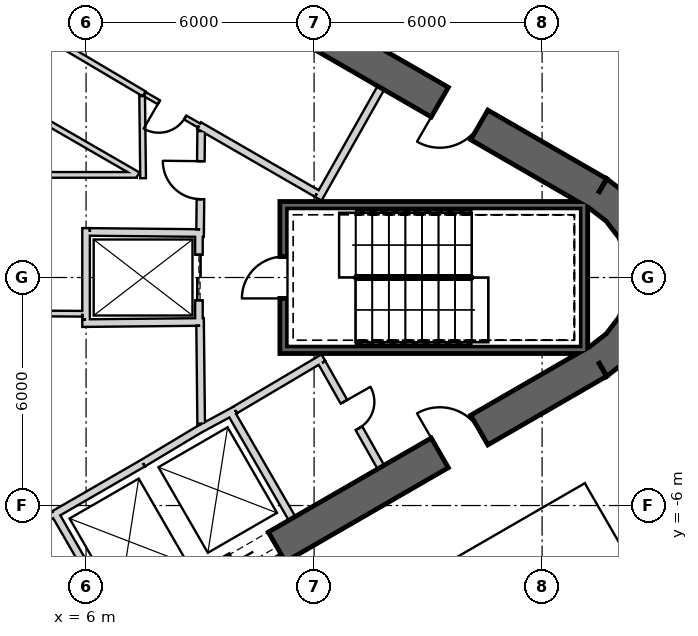
"""IFC4 building model, lengths in metres.
Left out: names, types, materials, properties, quantities, classifications, styles, units other than length and angle.
Written with IfcOpenShell. Run it as: python <this file> out.ifc"""

import sys

from ifc_helpers import new_model, si_unit, direction, frame, frame_2d, origin, place, context, subcontext, project, spatial, polyline, rectangle, outline, extrude, element, fill, save


model = new_model("IFC4")
c1 = context("Model", 3, precision=1e-05, world=origin(), true_north=direction((0.0, 1.0)))
c2 = subcontext(c1, "Body", "Model", "MODEL_VIEW")
j1 = project(units=[si_unit("LENGTHUNIT", "METRE"), si_unit("PLANEANGLEUNIT", "RADIAN")], contexts=[c1])
p1 = place(None, origin())
s1 = spatial("IfcSite", under=j1, at=p1, CompositionType="ELEMENT")
p2 = place(p1, origin())
s2 = spatial("IfcBuilding", under=s1, at=p2, CompositionType="ELEMENT")
p3 = place(p2, frame((0.0, 0.0, -5.5)))
s3 = spatial("IfcBuildingStorey", under=s2, at=p3, CompositionType="ELEMENT", Elevation=-5.5)
p4 = place(p3, frame((19.475, 2.208, 0.0), z_axis=(0.0, 0.0, 1.0), x_axis=(-0.866028369851, 0.499994862586, 0.0)))
e1 = element("IfcWall", 1, at=p4, inside=s3, PredefinedType="SHEAR", context=c2, shape_type="SweptSolid", body=[
    extrude(rectangle(XDim=31.523, YDim=0.9, at=frame_2d((15.762, 0.0))), origin(), (0.0, 0.0, 1.0), 5.5),
])
p5 = place(p4, frame((3.612, 0.0, 0.0)))
e2 = element("IfcOpeningElement", 2, at=p5, cuts=e1, PredefinedType="OPENING", context=c2, shape_type="SweptSolid", body=[
    extrude(rectangle(XDim=1.2, YDim=2.4, at=frame_2d((0.6, 1.2))), frame((0.0, 0.46, 0.0), z_axis=(0.0, -1.0, 0.0), x_axis=(1.0, 0.0, 0.0)), (0.0, 0.0, 1.0), 0.92),
])
p6 = place(p4, frame((26.712, 0.0, 0.0)))
e3 = element("IfcOpeningElement", 3, at=p6, cuts=e1, PredefinedType="OPENING", context=c2, shape_type="SweptSolid", body=[
    extrude(rectangle(XDim=1.2, YDim=2.4, at=frame_2d((0.6, 1.2))), frame((0.0, 0.46, 0.0), z_axis=(0.0, -1.0, 0.0), x_axis=(1.0, 0.0, 0.0)), (0.0, 0.0, 1.0), 0.92),
])
p7 = place(p3, frame((-7.825, -17.97, 0.0), z_axis=(0.0, 0.0, 1.0), x_axis=(0.866028369851, 0.499994862586, 0.0)))
e4 = element("IfcWall", 4, at=p7, inside=s3, PredefinedType="SHEAR", context=c2, shape_type="SweptSolid", body=[
    extrude(rectangle(XDim=31.523, YDim=0.9, at=frame_2d((15.762, 0.0))), origin(), (0.0, 0.0, 1.0), 5.5),
])
p8 = place(p7, frame((17.862, 0.0, 0.0)))
e5 = element("IfcOpeningElement", 5, at=p8, cuts=e4, PredefinedType="OPENING", context=c2, shape_type="SweptSolid", body=[
    extrude(rectangle(XDim=1.2, YDim=2.4, at=frame_2d((0.6, 1.2))), frame((0.0, 0.46, 0.0), z_axis=(0.0, -1.0, 0.0), x_axis=(1.0, 0.0, 0.0)), (0.0, 0.0, 1.0), 0.92),
])
p9 = place(p7, frame((20.562, 0.0, 0.0)))
e6 = element("IfcOpeningElement", 6, at=p9, cuts=e4, PredefinedType="OPENING", context=c2, shape_type="SweptSolid", body=[
    extrude(rectangle(XDim=1.2, YDim=2.4, at=frame_2d((0.6, 1.2))), frame((0.0, 0.46, 0.0), z_axis=(0.0, -1.0, 0.0), x_axis=(1.0, 0.0, 0.0)), (0.0, 0.0, 1.0), 0.92),
])
p10 = place(p7, frame((26.712, 0.0, 0.0)))
e7 = element("IfcOpeningElement", 7, at=p10, cuts=e4, PredefinedType="OPENING", context=c2, shape_type="SweptSolid", body=[
    extrude(rectangle(XDim=1.2, YDim=2.4, at=frame_2d((0.6, 1.2))), frame((0.0, 0.46, 0.0), z_axis=(0.0, -1.0, 0.0), x_axis=(1.0, 0.0, 0.0)), (0.0, 0.0, 1.0), 0.92),
])
p11 = place(p7, frame((3.612, 0.0, 0.0)))
e8 = element("IfcOpeningElement", 8, at=p11, cuts=e4, PredefinedType="OPENING", context=c2, shape_type="SweptSolid", body=[
    extrude(rectangle(XDim=1.2, YDim=2.4, at=frame_2d((0.6, 1.2))), frame((0.0, 0.46, 0.0), z_axis=(0.0, -1.0, 0.0), x_axis=(1.0, 0.0, 0.0)), (0.0, 0.0, 1.0), 0.92),
])
p12 = place(p3, origin())
e9 = element("IfcWall", 9, at=p12, inside=s3, PredefinedType="SHEAR", context=c2, shape_type="SweptSolid", body=[
    extrude(outline(polyline([(19.7, -2.598), (20.321, -2.121), (20.798, -1.5), (21.098, -0.777), (21.2, 0.0), (21.098, 0.777), (20.798, 1.5), (20.321, 2.121), (19.7, 2.598), (19.25, 1.819), (19.685, 1.485), (20.019, 1.05), (20.229, 0.543), (20.3, 0.0), (20.229, -0.543), (20.019, -1.05), (19.685, -1.485), (19.25, -1.819), (19.7, -2.598)])), origin(), (0.0, 0.0, 1.0), 5.5),
])
p13 = place(p3, frame((6.795, -9.01, 0.0), z_axis=(0.0, 0.0, 1.0), x_axis=(-0.499984717929, 0.866034226713, 0.0)))
e10 = element("IfcWall", 10, at=p13, inside=s3, PredefinedType="PLUMBINGWALL", context=c2, shape_type="SweptSolid", body=[
    extrude(rectangle(XDim=3.25, YDim=0.2, at=frame_2d((1.625, 0.0))), origin(), (0.0, 0.0, 1.0), 5.1),
])
p14 = place(p3, frame((5.159, -6.236, 0.0), z_axis=(0.0, 0.0, 1.0), x_axis=(0.866036505625, 0.499980770555, 0.0)))
e11 = element("IfcWall", 11, at=p14, inside=s3, PredefinedType="PLUMBINGWALL", context=c2, shape_type="SweptSolid", body=[
    extrude(rectangle(XDim=2.7, YDim=0.2, at=frame_2d((1.35, 0.0))), origin(), (0.0, 0.0, 1.0), 5.1),
])
p15 = place(p3, frame((9.795, -3.525, 0.0), z_axis=(0.0, 0.0, 1.0), x_axis=(0.499984717929, -0.866034226713, 0.0)))
e12 = element("IfcWall", 12, at=p15, inside=s3, PredefinedType="PLUMBINGWALL", context=c2, shape_type="SweptSolid", body=[
    extrude(rectangle(XDim=3.25, YDim=0.2, at=frame_2d((1.625, 0.0))), origin(), (0.0, 0.0, 1.0), 5.1),
])
p16 = place(p3, frame((8.974, -3.999, 0.0), z_axis=(0.0, 0.0, 1.0), x_axis=(0.880907015104, 0.473289373154, 0.0)))
e13 = element("IfcWall", 13, at=p16, inside=s3, PredefinedType="PLUMBINGWALL", context=c2, shape_type="SweptSolid", body=[
    extrude(rectangle(XDim=1.078, YDim=0.2, at=frame_2d((0.539, 0.0))), origin(), (0.0, 0.0, 1.0), 5.1),
])
p17 = place(p3, frame((7.497, -4.886, 0.0), z_axis=(0.0, 0.0, 1.0), x_axis=(0.857516281273, 0.51445682749, 0.0)))
e14 = element("IfcWall", 14, at=p17, inside=s3, PredefinedType="PLUMBINGWALL", context=c2, shape_type="SweptSolid", body=[
    extrude(rectangle(XDim=1.845, YDim=0.2, at=frame_2d((0.922, 0.0))), origin(), (0.0, 0.0, 1.0), 5.1),
])
p18 = place(p3, frame((19.2, 1.9, -0.4), z_axis=(0.0, 0.0, 1.0), x_axis=(-1.0, 0.0, 0.0)))
e15 = element("IfcWall", 15, at=p18, inside=s3, PredefinedType="SHEAR", context=c2, shape_type="SweptSolid", body=[
    extrude(rectangle(XDim=8.1, YDim=0.2, at=frame_2d((4.05, 0.0))), origin(), (0.0, 0.0, 1.0), 5.5),
])
p19 = place(p3, frame((19.1, -2.0, -0.4), z_axis=(0.0, 0.0, 1.0), x_axis=(0.0, 1.0, 0.0)))
e16 = element("IfcWall", 16, at=p19, inside=s3, PredefinedType="SHEAR", context=c2, shape_type="SweptSolid", body=[
    extrude(rectangle(XDim=3.8, YDim=0.2, at=frame_2d((1.9, 0.0))), origin(), (0.0, 0.0, 1.0), 5.5),
])
p20 = place(p3, frame((11.1, -1.9, -0.4), z_axis=(0.0, 0.0, 1.0), x_axis=(1.0, 0.0, 0.0)))
e17 = element("IfcWall", 17, at=p20, inside=s3, PredefinedType="SHEAR", context=c2, shape_type="SweptSolid", body=[
    extrude(rectangle(XDim=7.9, YDim=0.2, at=frame_2d((3.95, 0.0))), origin(), (0.0, 0.0, 1.0), 5.5),
])
p21 = place(p3, frame((11.2, -1.8, -0.4), z_axis=(0.0, 0.0, 1.0), x_axis=(0.0, 1.0, 0.0)))
e18 = element("IfcWall", 18, at=p21, inside=s3, PredefinedType="SHEAR", context=c2, shape_type="SweptSolid", body=[
    extrude(rectangle(XDim=3.6, YDim=0.2, at=frame_2d((1.8, 0.0))), origin(), (0.0, 0.0, 1.0), 5.5),
])
p22 = place(p21, frame((1.25, 0.0, 0.4)))
e19 = element("IfcOpeningElement", 19, at=p22, cuts=e18, PredefinedType="OPENING", context=c2, shape_type="SweptSolid", body=[
    extrude(rectangle(XDim=1.1, YDim=2.1, at=frame_2d((0.55, 1.05))), frame((0.0, 0.11, 0.0), z_axis=(0.0, -1.0, 0.0), x_axis=(1.0, 0.0, 0.0)), (0.0, 0.0, 1.0), 0.22),
])
p23 = place(p3, frame((8.97, 1.2, 0.0), z_axis=(0.0, 0.0, 1.0), x_axis=(0.0, -1.0, 0.0)))
e20 = element("IfcWall", 20, at=p23, inside=s3, PredefinedType="PLUMBINGWALL", context=c2, shape_type="SweptSolid", body=[
    extrude(rectangle(XDim=2.4, YDim=0.2, at=frame_2d((1.2, 0.0))), origin(), (0.0, 0.0, 1.0), 5.1),
])
p24 = place(p23, frame((0.6, 0.0, 0.0)))
e21 = element("IfcOpeningElement", 21, at=p24, cuts=e20, PredefinedType="OPENING", context=c2, shape_type="SweptSolid", body=[
    extrude(rectangle(XDim=1.2, YDim=2.4, at=frame_2d((0.6, 1.2))), frame((0.0, 0.11, 0.0), z_axis=(0.0, -1.0, 0.0), x_axis=(1.0, 0.0, 0.0)), (0.0, 0.0, 1.0), 0.22),
])
p25 = place(p3, frame((9.1, -1.169, 0.0), z_axis=(0.0, 0.0, 1.0), x_axis=(-0.999950064753, -0.009993397809, 0.0)))
e22 = element("IfcWall", 22, at=p25, inside=s3, PredefinedType="PLUMBINGWALL", context=c2, shape_type="SweptSolid", body=[
    extrude(rectangle(XDim=3.2, YDim=0.2, at=frame_2d((1.6, 0.0))), origin(), (0.0, 0.0, 1.0), 5.1),
])
p26 = place(p3, frame((6.0, -1.1, 0.0), z_axis=(0.0, 0.0, 1.0), x_axis=(0.0, 1.0, 0.0)))
e23 = element("IfcWall", 23, at=p26, inside=s3, PredefinedType="PLUMBINGWALL", context=c2, shape_type="SweptSolid", body=[
    extrude(rectangle(XDim=2.4, YDim=0.2, at=frame_2d((1.2, 0.0))), origin(), (0.0, 0.0, 1.0), 5.1),
])
p27 = place(p3, frame((9.1, 1.169, 0.0), z_axis=(0.0, 0.0, 1.0), x_axis=(-0.99994990606, 0.010009264196, 0.0)))
e24 = element("IfcWall", 24, at=p27, inside=s3, PredefinedType="PLUMBINGWALL", context=c2, shape_type="SweptSolid", body=[
    extrude(rectangle(XDim=3.0, YDim=0.2, at=frame_2d((1.5, 0.0))), origin(), (0.0, 0.0, 1.0), 5.1),
])
p28 = place(p3, frame((12.11, 2.073, 0.0), z_axis=(0.0, 0.0, 1.0), x_axis=(0.49196600604, 0.870614408852, 0.0)))
e25 = element("IfcWall", 25, at=p28, inside=s3, PredefinedType="PARTITIONING", context=c2, shape_type="SweptSolid", body=[
    extrude(rectangle(XDim=3.35, YDim=0.2, at=frame_2d((1.675, 0.0))), origin(), (0.0, 0.0, 1.0), 5.1),
])
p29 = place(p3, frame((8.974, 3.999, 0.0), z_axis=(0.0, 0.0, 1.0), x_axis=(0.86601284211, -0.500021756827, 0.0)))
e26 = element("IfcWall", 26, at=p29, inside=s3, PredefinedType="PARTITIONING", context=c2, shape_type="SweptSolid", body=[
    extrude(rectangle(XDim=3.577, YDim=0.2, at=frame_2d((1.789, 0.0))), origin(), (0.0, 0.0, 1.0), 5.1),
])
p30 = place(p3, frame((5.159, 6.236, 0.0), z_axis=(0.0, 0.0, 1.0), x_axis=(0.860550523279, -0.509365091938, 0.0)))
e27 = element("IfcWall", 27, at=p30, inside=s3, PredefinedType="PLUMBINGWALL", context=c2, shape_type="SweptSolid", body=[
    extrude(rectangle(XDim=2.755, YDim=0.15, at=frame_2d((1.377, 0.0))), origin(), (0.0, 0.0, 1.0), 5.1),
])
p31 = place(p3, frame((7.55, 4.821, 0.0), z_axis=(0.0, 0.0, 1.0), x_axis=(0.866069384335, -0.499923815713, 0.0)))
e28 = element("IfcWall", 28, at=p31, inside=s3, PredefinedType="PARTITIONING", context=c2, shape_type="SweptSolid", body=[
    extrude(rectangle(XDim=1.644, YDim=0.12, at=frame_2d((0.822, 0.0))), origin(), (0.0, 0.0, 1.0), 5.1),
])
p32 = place(p31, frame((0.422, 0.0, 0.0)))
e29 = element("IfcOpeningElement", 29, at=p32, cuts=e28, PredefinedType="OPENING", context=c2, shape_type="SweptSolid", body=[
    extrude(rectangle(XDim=0.8, YDim=2.1, at=frame_2d((0.4, 1.05))), frame((0.0, 0.07, 0.0), z_axis=(0.0, -1.0, 0.0), x_axis=(1.0, 0.0, 0.0)), (0.0, 0.0, 1.0), 0.14),
])
p33 = place(p3, frame((0.483, -8.936, 0.0), z_axis=(0.0, 0.0, 1.0), x_axis=(0.866028230842, 0.499995103361, 0.0)))
e30 = element("IfcWall", 30, at=p33, inside=s3, PredefinedType="PLUMBINGWALL", context=c2, shape_type="SweptSolid", body=[
    extrude(rectangle(XDim=5.4, YDim=0.15, at=frame_2d((2.7, 0.0))), origin(), (0.0, 0.0, 1.0), 5.1),
])
p34 = place(p3, frame((12.245, -2.109, 0.0), z_axis=(0.0, 0.0, 1.0), x_axis=(-0.860414880418, -0.509594185166, 0.0)))
e31 = element("IfcWall", 31, at=p34, inside=s3, PredefinedType="PARTITIONING", context=c2, shape_type="SweptSolid", body=[
    extrude(rectangle(XDim=2.7, YDim=0.2, at=frame_2d((1.35, 0.0))), origin(), (0.0, 0.0, 1.0), 5.1),
])
p35 = place(p3, frame((13.758, -4.99, 0.0), z_axis=(0.0, 0.0, 1.0), x_axis=(-0.491993409184, 0.87059892334, 0.0)))
e32 = element("IfcWall", 32, at=p35, inside=s3, PredefinedType="PARTITIONING", context=c2, shape_type="SweptSolid", body=[
    extrude(rectangle(XDim=3.15, YDim=0.2, at=frame_2d((1.575, 0.0))), origin(), (0.0, 0.0, 1.0), 5.1),
])
p36 = place(p35, frame((1.175, 0.0, 0.0)))
e33 = element("IfcOpeningElement", 33, at=p36, cuts=e32, PredefinedType="OPENING", context=c2, shape_type="SweptSolid", body=[
    extrude(rectangle(XDim=0.8, YDim=2.1, at=frame_2d((0.4, 1.05))), frame((0.0, 0.11, 0.0), z_axis=(0.0, -1.0, 0.0), x_axis=(1.0, 0.0, 0.0)), (0.0, 0.0, 1.0), 0.22),
])
p37 = place(p3, frame((9.029, -3.851, 0.0), z_axis=(0.0, 0.0, 1.0), x_axis=(-0.010784614026, 0.999941844359, 0.0)))
e34 = element("IfcWall", 34, at=p37, inside=s3, PredefinedType="PARTITIONING", context=c2, shape_type="SweptSolid", body=[
    extrude(rectangle(XDim=2.581, YDim=0.2, at=frame_2d((1.291, 0.0))), origin(), (0.0, 0.0, 1.0), 5.1),
])
p38 = place(p3, frame((9.001, 1.27, 0.0), z_axis=(0.0, 0.0, 1.0), x_axis=(0.010780534828, 0.999941888346, 0.0)))
e35 = element("IfcWall", 35, at=p38, inside=s3, PredefinedType="PARTITIONING", context=c2, shape_type="SweptSolid", body=[
    extrude(rectangle(XDim=2.582, YDim=0.2, at=frame_2d((1.291, 0.0))), origin(), (0.0, 0.0, 1.0), 5.1),
])
p39 = place(p38, frame((0.791, 0.0, 0.0)))
e36 = element("IfcOpeningElement", 36, at=p39, cuts=e35, PredefinedType="OPENING", context=c2, shape_type="SweptSolid", body=[
    extrude(rectangle(XDim=1.0, YDim=2.1, at=frame_2d((0.5, 1.05))), frame((0.0, 0.11, 0.0), z_axis=(0.0, -1.0, 0.0), x_axis=(1.0, 0.0, 0.0)), (0.0, 0.0, 1.0), 0.22),
])
p40 = place(p3, frame((5.9, -0.954, 0.0), z_axis=(0.0, 0.0, 1.0), x_axis=(-0.999979813999, 0.006353864523, 0.0)))
e37 = element("IfcWall", 37, at=p40, inside=s3, PredefinedType="PLUMBINGWALL", context=c2, shape_type="SweptSolid", body=[
    extrude(rectangle(XDim=4.534, YDim=0.15, at=frame_2d((2.267, 0.0))), origin(), (0.0, 0.0, 1.0), 5.1),
])
p41 = place(p40, frame((1.867, 0.0, 0.0)))
e38 = element("IfcOpeningElement", 38, at=p41, cuts=e37, PredefinedType="OPENING", context=c2, shape_type="SweptSolid", body=[
    extrude(rectangle(XDim=0.8, YDim=2.1, at=frame_2d((0.4, 1.05))), frame((0.0, 0.085, 0.0), z_axis=(0.0, -1.0, 0.0), x_axis=(1.0, 0.0, 0.0)), (0.0, 0.0, 1.0), 0.17),
])
p42 = place(p3, frame((7.367, 2.7, 0.0), z_axis=(0.0, 0.0, 1.0), x_axis=(-0.866027158831, 0.499996960157, 0.0)))
e39 = element("IfcWall", 39, at=p42, inside=s3, PredefinedType="PLUMBINGWALL", context=c2, shape_type="SweptSolid", body=[
    extrude(rectangle(XDim=10.06, YDim=0.15, at=frame_2d((5.03, 0.0))), origin(), (0.0, 0.0, 1.0), 5.1),
])
p43 = place(p3, frame((7.501, 2.613, 0.0), z_axis=(0.0, 0.0, 1.0), x_axis=(-0.011734691853, 0.999931146133, 0.0)))
e40 = element("IfcWall", 40, at=p43, inside=s3, PredefinedType="PLUMBINGWALL", context=c2, shape_type="SweptSolid", body=[
    extrude(rectangle(XDim=2.164, YDim=0.15, at=frame_2d((1.082, 0.0))), origin(), (0.0, 0.0, 1.0), 5.1),
])
p44 = place(p3, frame((4.425, 2.7, 0.0), z_axis=(0.0, 0.0, 1.0), x_axis=(1.0, 0.0, 0.0)))
e41 = element("IfcWall", 41, at=p44, inside=s3, PredefinedType="PLUMBINGWALL", context=c2, shape_type="SweptSolid", body=[
    extrude(rectangle(XDim=2.912, YDim=0.15, at=frame_2d((1.456, 0.0))), origin(), (0.0, 0.0, 1.0), 5.1),
])
p45 = place(p3, frame((32.38, 0.046, 0.0), z_axis=(0.0, 0.0, 1.0), x_axis=(-0.86611360534, 0.499847199298, 0.0)))
e42 = element("IfcWall", 42, at=p45, inside=s3, PredefinedType="PARTITIONING", context=c2, shape_type="SweptSolid", body=[
    extrude(rectangle(XDim=56.078, YDim=0.12, at=frame_2d((28.039, 0.0))), origin(), (0.0, 0.0, 1.0), 4.07),
])
p46 = place(p45, frame((30.481, 0.0, 0.0)))
e43 = element("IfcOpeningElement", 43, at=p46, cuts=e42, PredefinedType="OPENING", context=c2, shape_type="SweptSolid", body=[
    extrude(rectangle(XDim=1.2, YDim=2.4, at=frame_2d((0.6, 1.2))), frame((0.0, 0.07, 0.0), z_axis=(0.0, -1.0, 0.0), x_axis=(1.0, 0.0, 0.0)), (0.0, 0.0, 1.0), 0.14),
])
p47 = place(p45, frame((10.481, 0.0, 0.0)))
e44 = element("IfcOpeningElement", 44, at=p47, cuts=e42, PredefinedType="OPENING", context=c2, shape_type="SweptSolid", body=[
    extrude(rectangle(XDim=1.2, YDim=2.4, at=frame_2d((0.6, 1.2))), frame((0.0, 0.07, 0.0), z_axis=(0.0, -1.0, 0.0), x_axis=(1.0, 0.0, 0.0)), (0.0, 0.0, 1.0), 0.14),
])
p48 = place(p45, frame((45.282, 0.0, 0.0)))
e45 = element("IfcOpeningElement", 45, at=p48, cuts=e42, PredefinedType="OPENING", context=c2, shape_type="SweptSolid", body=[
    extrude(rectangle(XDim=0.9, YDim=2.1, at=frame_2d((0.45, 1.05))), frame((0.0, 0.07, 0.0), z_axis=(0.0, -1.0, 0.0), x_axis=(1.0, 0.0, 0.0)), (0.0, 0.0, 1.0), 0.14),
])
p49 = place(p45, frame((52.061, 0.0, 0.0)))
e46 = element("IfcOpeningElement", 46, at=p49, cuts=e42, PredefinedType="OPENING", context=c2, shape_type="SweptSolid", body=[
    extrude(rectangle(XDim=1.0, YDim=2.1, at=frame_2d((0.5, 1.05))), frame((0.0, 0.07, 0.0), z_axis=(0.0, -1.0, 0.0), x_axis=(1.0, 0.0, 0.0)), (0.0, 0.0, 1.0), 0.14),
])
p50 = place(p22, origin())
e47 = element("IfcDoor", 47, at=p50, inside=s3, OperationType="SINGLE_SWING_LEFT", PredefinedType="USERDEFINED", context=c2, shape_type="SweptSolid", body=[
    extrude(rectangle(XDim=1.1, YDim=2.1, at=frame_2d((0.55, 1.05))), frame((0.0, 0.025, 0.0), z_axis=(0.0, -1.0, 0.0), x_axis=(1.0, 0.0, 0.0)), (0.0, 0.0, 1.0), 0.05),
])
fill(e19, e47)
p51 = place(p39, origin())
e48 = element("IfcDoor", 48, at=p51, inside=s3, OperationType="SINGLE_SWING_RIGHT", PredefinedType="USERDEFINED", context=c2, shape_type="SweptSolid", body=[
    extrude(rectangle(XDim=1.0, YDim=2.1, at=frame_2d((0.5, 1.05))), frame((0.0, 0.025, 0.0), z_axis=(0.0, -1.0, 0.0), x_axis=(1.0, 0.0, 0.0)), (0.0, 0.0, 1.0), 0.05),
])
fill(e36, e48)
p52 = place(p24, origin())
e49 = element("IfcDoor", 49, at=p52, inside=s3, OperationType="SLIDING_TO_LEFT", PredefinedType="USERDEFINED", context=c2, shape_type="SweptSolid", body=[
    extrude(rectangle(XDim=1.2, YDim=2.4, at=frame_2d((0.6, 1.2))), frame((0.0, 0.025, 0.0), z_axis=(0.0, -1.0, 0.0), x_axis=(1.0, 0.0, 0.0)), (0.0, 0.0, 1.0), 0.05),
])
fill(e21, e49)
p53 = place(p32, origin())
e50 = element("IfcDoor", 50, at=p53, inside=s3, OperationType="SINGLE_SWING_LEFT", PredefinedType="USERDEFINED", context=c2, shape_type="SweptSolid", body=[
    extrude(rectangle(XDim=0.8, YDim=2.1, at=frame_2d((0.4, 1.05))), frame((0.0, 0.025, 0.0), z_axis=(0.0, -1.0, 0.0), x_axis=(1.0, 0.0, 0.0)), (0.0, 0.0, 1.0), 0.05),
])
fill(e29, e50)
p54 = place(p36, origin())
e51 = element("IfcDoor", 51, at=p54, inside=s3, OperationType="SINGLE_SWING_RIGHT", PredefinedType="USERDEFINED", context=c2, shape_type="SweptSolid", body=[
    extrude(rectangle(XDim=0.8, YDim=2.1, at=frame_2d((0.4, 1.05))), frame((0.0, 0.025, 0.0), z_axis=(0.0, -1.0, 0.0), x_axis=(1.0, 0.0, 0.0)), (0.0, 0.0, 1.0), 0.05),
])
fill(e33, e51)
p55 = place(p9, origin())
e52 = element("IfcDoor", 52, at=p55, inside=s3, OperationType="SLIDING_TO_LEFT", PredefinedType="USERDEFINED", context=c2, shape_type="SweptSolid", body=[
    extrude(rectangle(XDim=1.2, YDim=2.4, at=frame_2d((0.6, 1.2))), frame((0.0, 0.025, 0.0), z_axis=(0.0, -1.0, 0.0), x_axis=(1.0, 0.0, 0.0)), (0.0, 0.0, 1.0), 0.05),
])
fill(e6, e52)
p56 = place(p10, origin())
e53 = element("IfcDoor", 53, at=p56, inside=s3, OperationType="SINGLE_SWING_LEFT", PredefinedType="USERDEFINED", context=c2, shape_type="SweptSolid", body=[
    extrude(rectangle(XDim=1.2, YDim=2.4, at=frame_2d((0.6, 1.2))), frame((0.0, 0.025, 0.0), z_axis=(0.0, -1.0, 0.0), x_axis=(1.0, 0.0, 0.0)), (0.0, 0.0, 1.0), 0.05),
])
fill(e7, e53)
p57 = place(p5, origin())
e54 = element("IfcDoor", 54, at=p57, inside=s3, OperationType="SINGLE_SWING_RIGHT", PredefinedType="USERDEFINED", context=c2, shape_type="SweptSolid", body=[
    extrude(rectangle(XDim=1.2, YDim=2.4, at=frame_2d((0.6, 1.2))), frame((0.0, 0.025, 0.0), z_axis=(0.0, -1.0, 0.0), x_axis=(1.0, 0.0, 0.0)), (0.0, 0.0, 1.0), 0.05),
])
fill(e2, e54)
save(model, sys.argv[1])
